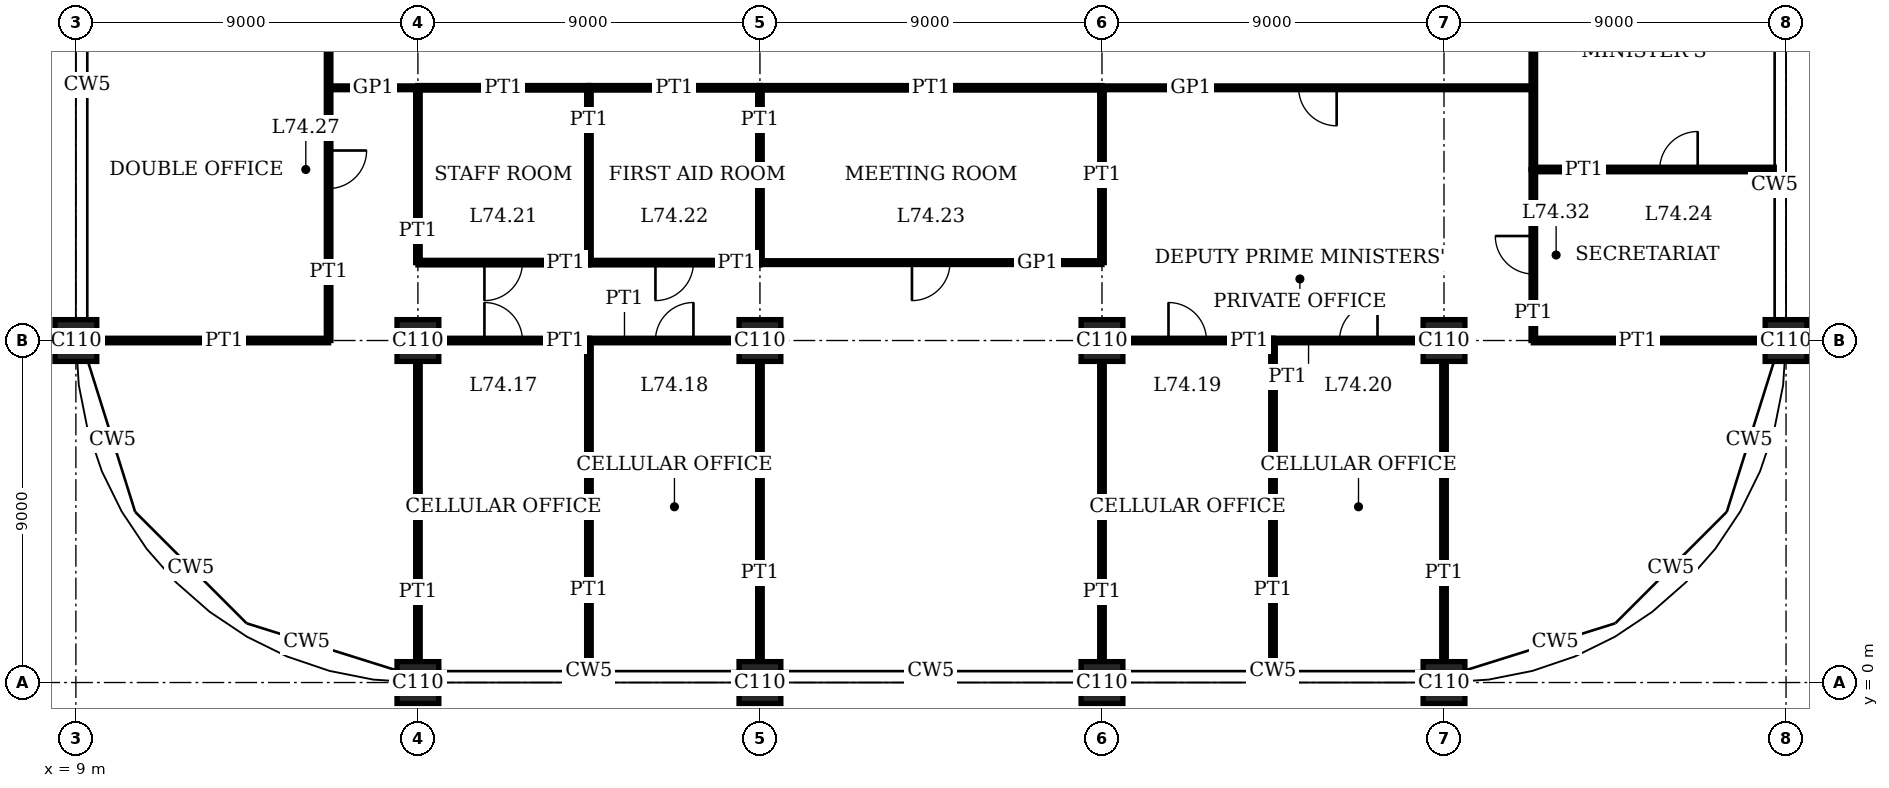
"""IFC4 building model, lengths in metres.
Left out: names, types, materials, properties, quantities, classifications, styles, units other than length and angle.
Written with IfcOpenShell. Run it as: python <this file> out.ifc"""

import sys

from ifc_helpers import new_model, si_unit, direction, frame, frame_2d, origin, origin_2d, place, context, subcontext, project, spatial, rectangle, extrude, element, fill, save


model = new_model("IFC4")
c1 = context("Model", 3, precision=1e-05, world=origin(), true_north=direction((0.0, 1.0)))
c2 = subcontext(c1, "Body", "Model", "MODEL_VIEW")
j1 = project(units=[si_unit("LENGTHUNIT", "METRE"), si_unit("PLANEANGLEUNIT", "RADIAN")], contexts=[c1])
p1 = place(None, origin())
s1 = spatial("IfcSite", under=j1, at=p1, CompositionType="ELEMENT")
p2 = place(p1, origin())
s2 = spatial("IfcBuilding", under=s1, at=p2, CompositionType="ELEMENT")
p3 = place(p2, frame((0.0, 0.0, 303.4)))
s3 = spatial("IfcBuildingStorey", under=s2, at=p3, CompositionType="ELEMENT", Elevation=303.4)
for number, where, z_axis, x_axis in (
    (1, (9.0, 9.0, 0.0), (0.0, 0.0, 1.0), (1.0, 0.0, 0.0)),
    (2, (18.0, 0.0, 0.0), (0.0, 0.0, 1.0), (1.0, 0.0, 0.0)),
    (3, (18.0, 9.0, 0.0), (0.0, 0.0, 1.0), (1.0, 0.0, 0.0)),
    (4, (27.0, 0.0, 0.0), (0.0, 0.0, 1.0), (1.0, 0.0, 0.0)),
    (5, (27.0, 9.0, 0.0), (0.0, 0.0, 1.0), (1.0, 0.0, 0.0)),
    (6, (36.0, 0.0, 0.0), (0.0, 0.0, 1.0), (1.0, 0.0, 0.0)),
    (7, (36.0, 9.0, 0.0), (0.0, 0.0, 1.0), (1.0, 0.0, 0.0)),
    (8, (45.0, 0.0, 0.0), (0.0, 0.0, 1.0), (1.0, 0.0, 0.0)),
    (9, (45.0, 9.0, 0.0), (0.0, 0.0, 1.0), (1.0, 0.0, 0.0)),
    (10, (54.0, 9.0, 0.0), (0.0, 0.0, 1.0), (1.0, 0.0, 0.0)),
):
    element("IfcColumn", number, at=place(p3, frame(where, z_axis=z_axis, x_axis=x_axis)), inside=s3, PredefinedType="COLUMN", context=c2, shape_type="SweptSolid", body=[
        extrude(rectangle(XDim=1.1, YDim=1.1, at=origin_2d()), origin(), (0.0, 0.0, 1.0), 4.0),
    ])
p4 = place(p3, frame((47.35, 9.0, 0.0), z_axis=(0.0, 0.0, 1.0), x_axis=(1.0, 0.0, 0.0)))
e11 = element("IfcWall", 11, at=p4, inside=s3, PredefinedType="PARTITIONING", context=c2, shape_type="SweptSolid", body=[
    extrude(rectangle(XDim=6.1, YDim=0.12, at=frame_2d((3.05, 0.0))), origin(), (0.0, 0.0, 1.0), 3.05),
])
p5 = place(p3, frame((18.55, 9.0, 0.0), z_axis=(0.0, 0.0, 1.0), x_axis=(1.0, 0.0, 0.0)))
e12 = element("IfcWall", 12, at=p5, inside=s3, PredefinedType="PARTITIONING", context=c2, shape_type="SweptSolid", body=[
    extrude(rectangle(XDim=3.95, YDim=0.12, at=frame_2d((1.975, 0.0))), origin(), (0.0, 0.0, 1.0), 3.05),
])
p6 = place(p5, frame((1.2, 0.0, 0.0)))
e13 = element("IfcOpeningElement", 13, at=p6, cuts=e12, PredefinedType="OPENING", context=c2, shape_type="SweptSolid", body=[
    extrude(rectangle(XDim=1.0, YDim=2.4, at=frame_2d((0.5, 1.2))), frame((0.0, 0.07, 0.0), z_axis=(0.0, -1.0, 0.0), x_axis=(1.0, 0.0, 0.0)), (0.0, 0.0, 1.0), 0.14),
])
p7 = place(p3, frame((22.5, 9.0, 0.0), z_axis=(0.0, 0.0, 1.0), x_axis=(1.0, 0.0, 0.0)))
e14 = element("IfcWall", 14, at=p7, inside=s3, PredefinedType="PARTITIONING", context=c2, shape_type="SweptSolid", body=[
    extrude(rectangle(XDim=3.95, YDim=0.12, at=frame_2d((1.975, 0.0))), origin(), (0.0, 0.0, 1.0), 3.05),
])
p8 = place(p7, frame((1.75, 0.0, 0.0)))
e15 = element("IfcOpeningElement", 15, at=p8, cuts=e14, PredefinedType="OPENING", context=c2, shape_type="SweptSolid", body=[
    extrude(rectangle(XDim=1.0, YDim=2.4, at=frame_2d((0.5, 1.2))), frame((0.0, 0.07, 0.0), z_axis=(0.0, -1.0, 0.0), x_axis=(1.0, 0.0, 0.0)), (0.0, 0.0, 1.0), 0.14),
])
p9 = place(p3, frame((36.55, 9.0, 0.0), z_axis=(0.0, 0.0, 1.0), x_axis=(1.0, 0.0, 0.0)))
e16 = element("IfcWall", 16, at=p9, inside=s3, PredefinedType="PARTITIONING", context=c2, shape_type="SweptSolid", body=[
    extrude(rectangle(XDim=3.95, YDim=0.12, at=frame_2d((1.975, 0.0))), origin(), (0.0, 0.0, 1.0), 3.05),
])
p10 = place(p9, frame((1.2, 0.0, 0.0)))
e17 = element("IfcOpeningElement", 17, at=p10, cuts=e16, PredefinedType="OPENING", context=c2, shape_type="SweptSolid", body=[
    extrude(rectangle(XDim=1.0, YDim=2.4, at=frame_2d((0.5, 1.2))), frame((0.0, 0.07, 0.0), z_axis=(0.0, -1.0, 0.0), x_axis=(1.0, 0.0, 0.0)), (0.0, 0.0, 1.0), 0.14),
])
p11 = place(p3, frame((40.5, 9.0, 0.0), z_axis=(0.0, 0.0, 1.0), x_axis=(1.0, 0.0, 0.0)))
e18 = element("IfcWall", 18, at=p11, inside=s3, PredefinedType="PARTITIONING", context=c2, shape_type="SweptSolid", body=[
    extrude(rectangle(XDim=3.95, YDim=0.12, at=frame_2d((1.975, 0.0))), origin(), (0.0, 0.0, 1.0), 3.05),
])
p12 = place(p11, frame((1.75, 0.0, 0.0)))
e19 = element("IfcOpeningElement", 19, at=p12, cuts=e18, PredefinedType="OPENING", context=c2, shape_type="SweptSolid", body=[
    extrude(rectangle(XDim=1.0, YDim=2.4, at=frame_2d((0.5, 1.2))), frame((0.0, 0.07, 0.0), z_axis=(0.0, -1.0, 0.0), x_axis=(1.0, 0.0, 0.0)), (0.0, 0.0, 1.0), 0.14),
])
p13 = place(p3, frame((9.55, 9.0, 0.0), z_axis=(0.0, 0.0, 1.0), x_axis=(1.0, 0.0, 0.0)))
e20 = element("IfcWall", 20, at=p13, inside=s3, PredefinedType="PARTITIONING", context=c2, shape_type="SweptSolid", body=[
    extrude(rectangle(XDim=6.1, YDim=0.12, at=frame_2d((3.05, 0.0))), origin(), (0.0, 0.0, 1.0), 3.05),
])
p14 = place(p3, frame((18.0, 11.05, 0.0), z_axis=(0.0, 0.0, 1.0), x_axis=(1.0, 0.0, 0.0)))
e21 = element("IfcWall", 21, at=p14, inside=s3, PredefinedType="PARTITIONING", context=c2, shape_type="SweptSolid", body=[
    extrude(rectangle(XDim=4.5, YDim=0.12, at=frame_2d((2.25, 0.0))), origin(), (0.0, 0.0, 1.0), 3.75),
])
p15 = place(p14, frame((1.75, 0.0, 0.0)))
e22 = element("IfcOpeningElement", 22, at=p15, cuts=e21, PredefinedType="OPENING", context=c2, shape_type="SweptSolid", body=[
    extrude(rectangle(XDim=1.0, YDim=2.4, at=frame_2d((0.5, 1.2))), frame((0.0, 0.07, 0.0), z_axis=(0.0, -1.0, 0.0), x_axis=(1.0, 0.0, 0.0)), (0.0, 0.0, 1.0), 0.14),
])
p16 = place(p3, frame((22.5, 11.05, 0.0), z_axis=(0.0, 0.0, 1.0), x_axis=(1.0, 0.0, 0.0)))
e23 = element("IfcWall", 23, at=p16, inside=s3, PredefinedType="PARTITIONING", context=c2, shape_type="SweptSolid", body=[
    extrude(rectangle(XDim=4.5, YDim=0.12, at=frame_2d((2.25, 0.0))), origin(), (0.0, 0.0, 1.0), 3.75),
])
p17 = place(p16, frame((1.75, 0.0, 0.0)))
e24 = element("IfcOpeningElement", 24, at=p17, cuts=e23, PredefinedType="OPENING", context=c2, shape_type="SweptSolid", body=[
    extrude(rectangle(XDim=1.0, YDim=2.4, at=frame_2d((0.5, 1.2))), frame((0.0, 0.07, 0.0), z_axis=(0.0, -1.0, 0.0), x_axis=(1.0, 0.0, 0.0)), (0.0, 0.0, 1.0), 0.14),
])
p18 = place(p3, frame((27.0, 11.05, 0.0), z_axis=(0.0, 0.0, 1.0), x_axis=(1.0, 0.0, 0.0)))
e25 = element("IfcWall", 25, at=p18, inside=s3, PredefinedType="PARTITIONING", context=c2, shape_type="SweptSolid", body=[
    extrude(rectangle(XDim=9.0, YDim=0.1, at=frame_2d((4.5, 0.0))), origin(), (0.0, 0.0, 1.0), 3.75),
])
p19 = place(p18, frame((4.0, 0.0, 0.0)))
e26 = element("IfcOpeningElement", 26, at=p19, cuts=e25, PredefinedType="OPENING", context=c2, shape_type="SweptSolid", body=[
    extrude(rectangle(XDim=1.0, YDim=2.4, at=frame_2d((0.5, 1.2))), frame((0.0, 0.06, 0.0), z_axis=(0.0, -1.0, 0.0), x_axis=(1.0, 0.0, 0.0)), (0.0, 0.0, 1.0), 0.12),
])
p20 = place(p3, frame((47.35, 13.5, 0.0), z_axis=(0.0, 0.0, 1.0), x_axis=(1.0, 0.0, 0.0)))
e27 = element("IfcWall", 27, at=p20, inside=s3, PredefinedType="PARTITIONING", context=c2, shape_type="SweptSolid", body=[
    extrude(rectangle(XDim=6.34, YDim=0.12, at=frame_2d((3.17, 0.0))), origin(), (0.0, 0.0, 1.0), 3.1),
])
p21 = place(p20, frame((3.325, 0.0, 0.0)))
e28 = element("IfcOpeningElement", 28, at=p21, cuts=e27, PredefinedType="OPENING", context=c2, shape_type="SweptSolid", body=[
    extrude(rectangle(XDim=1.0, YDim=2.4, at=frame_2d((0.5, 1.2))), frame((0.0, 0.07, 0.0), z_axis=(0.0, -1.0, 0.0), x_axis=(1.0, 0.0, 0.0)), (0.0, 0.0, 1.0), 0.14),
])
p22 = place(p3, frame((27.0, 15.65, 0.0), z_axis=(0.0, 0.0, 1.0), x_axis=(1.0, 0.0, 0.0)))
e29 = element("IfcWall", 29, at=p22, inside=s3, PredefinedType="PARTITIONING", context=c2, shape_type="SweptSolid", body=[
    extrude(rectangle(XDim=9.0, YDim=0.12, at=frame_2d((4.5, 0.0))), origin(), (0.0, 0.0, 1.0), 3.75),
])
for number, where, z_axis, x_axis in (
    (30, (18.0, 15.65, 0.0), (0.0, 0.0, 1.0), (1.0, 0.0, 0.0)),
    (31, (22.5, 15.65, 0.0), (0.0, 0.0, 1.0), (1.0, 0.0, 0.0)),
):
    element("IfcWall", number, at=place(p3, frame(where, z_axis=z_axis, x_axis=x_axis)), inside=s3, PredefinedType="PARTITIONING", context=c2, shape_type="SweptSolid", body=[
        extrude(rectangle(XDim=4.5, YDim=0.12, at=frame_2d((2.25, 0.0))), origin(), (0.0, 0.0, 1.0), 3.75),
    ])
p23 = place(p3, frame((36.01, 15.65, 0.0), z_axis=(0.0, 0.0, 1.0), x_axis=(1.0, 0.0, 0.0)))
e32 = element("IfcWall", 32, at=p23, inside=s3, PredefinedType="PARTITIONING", context=c2, shape_type="SweptSolid", body=[
    extrude(rectangle(XDim=11.33, YDim=0.1, at=frame_2d((5.665, 0.0))), origin(), (0.0, 0.0, 1.0), 3.75),
])
p24 = place(p23, frame((5.165, 0.0, 0.0)))
e33 = element("IfcOpeningElement", 33, at=p24, cuts=e32, PredefinedType="OPENING", context=c2, shape_type="SweptSolid", body=[
    extrude(rectangle(XDim=1.0, YDim=2.4, at=frame_2d((0.5, 1.2))), frame((0.0, 0.06, 0.0), z_axis=(0.0, -1.0, 0.0), x_axis=(1.0, 0.0, 0.0)), (0.0, 0.0, 1.0), 0.12),
])
p25 = place(p3, frame((15.66, 15.65, 0.0), z_axis=(0.0, 0.0, 1.0), x_axis=(1.0, 0.0, 0.0)))
e34 = element("IfcWall", 34, at=p25, inside=s3, PredefinedType="PARTITIONING", context=c2, shape_type="SweptSolid", body=[
    extrude(rectangle(XDim=2.33, YDim=0.1, at=frame_2d((1.165, 0.0))), origin(), (0.0, 0.0, 1.0), 3.75),
])
p26 = place(p3, frame((15.65, 9.0, 0.0), z_axis=(0.0, 0.0, 1.0), x_axis=(0.0, 1.0, 0.0)))
e35 = element("IfcWall", 35, at=p26, inside=s3, PredefinedType="PARTITIONING", context=c2, shape_type="SweptSolid", body=[
    extrude(rectangle(XDim=9.0, YDim=0.12, at=frame_2d((4.5, 0.0))), origin(), (0.0, 0.0, 1.0), 3.75),
])
p27 = place(p26, frame((4.0, 0.0, 0.0)))
e36 = element("IfcOpeningElement", 36, at=p27, cuts=e35, PredefinedType="OPENING", context=c2, shape_type="SweptSolid", body=[
    extrude(rectangle(XDim=1.0, YDim=2.4, at=frame_2d((0.5, 1.2))), frame((0.0, 0.07, 0.0), z_axis=(0.0, -1.0, 0.0), x_axis=(1.0, 0.0, 0.0)), (0.0, 0.0, 1.0), 0.14),
])
p28 = place(p3, frame((18.0, 0.55, 0.0), z_axis=(0.0, 0.0, 1.0), x_axis=(0.0, 1.0, 0.0)))
e37 = element("IfcWall", 37, at=p28, inside=s3, PredefinedType="PARTITIONING", context=c2, shape_type="SweptSolid", body=[
    extrude(rectangle(XDim=7.9, YDim=0.12, at=frame_2d((3.95, 0.0))), origin(), (0.0, 0.0, 1.0), 3.05),
])
p29 = place(p3, frame((18.0, 11.05, 0.0), z_axis=(0.0, 0.0, 1.0), x_axis=(0.0, 1.0, 0.0)))
e38 = element("IfcWall", 38, at=p29, inside=s3, PredefinedType="PARTITIONING", context=c2, shape_type="SweptSolid", body=[
    extrude(rectangle(XDim=4.6, YDim=0.12, at=frame_2d((2.3, 0.0))), origin(), (0.0, 0.0, 1.0), 3.05),
])
p30 = place(p3, frame((22.5, 0.31, 0.0), z_axis=(0.0, 0.0, 1.0), x_axis=(0.0, 1.0, 0.0)))
e39 = element("IfcWall", 39, at=p30, inside=s3, PredefinedType="PARTITIONING", context=c2, shape_type="SweptSolid", body=[
    extrude(rectangle(XDim=8.69, YDim=0.12, at=frame_2d((4.345, 0.0))), origin(), (0.0, 0.0, 1.0), 3.75),
])
p31 = place(p3, frame((22.5, 11.05, 0.0), z_axis=(0.0, 0.0, 1.0), x_axis=(0.0, 1.0, 0.0)))
e40 = element("IfcWall", 40, at=p31, inside=s3, PredefinedType="PARTITIONING", context=c2, shape_type="SweptSolid", body=[
    extrude(rectangle(XDim=4.6, YDim=0.12, at=frame_2d((2.3, 0.0))), origin(), (0.0, 0.0, 1.0), 3.75),
])
p32 = place(p3, frame((27.0, 0.55, 0.0), z_axis=(0.0, 0.0, 1.0), x_axis=(0.0, 1.0, 0.0)))
e41 = element("IfcWall", 41, at=p32, inside=s3, PredefinedType="PARTITIONING", context=c2, shape_type="SweptSolid", body=[
    extrude(rectangle(XDim=7.9, YDim=0.12, at=frame_2d((3.95, 0.0))), origin(), (0.0, 0.0, 1.0), 3.05),
])
p33 = place(p3, frame((27.0, 11.05, 0.0), z_axis=(0.0, 0.0, 1.0), x_axis=(0.0, 1.0, 0.0)))
e42 = element("IfcWall", 42, at=p33, inside=s3, PredefinedType="PARTITIONING", context=c2, shape_type="SweptSolid", body=[
    extrude(rectangle(XDim=4.6, YDim=0.12, at=frame_2d((2.3, 0.0))), origin(), (0.0, 0.0, 1.0), 3.05),
])
p34 = place(p3, frame((36.0, 0.55, 0.0), z_axis=(0.0, 0.0, 1.0), x_axis=(0.0, 1.0, 0.0)))
e43 = element("IfcWall", 43, at=p34, inside=s3, PredefinedType="PARTITIONING", context=c2, shape_type="SweptSolid", body=[
    extrude(rectangle(XDim=7.9, YDim=0.12, at=frame_2d((3.95, 0.0))), origin(), (0.0, 0.0, 1.0), 3.05),
])
p35 = place(p3, frame((36.0, 11.05, 0.0), z_axis=(0.0, 0.0, 1.0), x_axis=(0.0, 1.0, 0.0)))
e44 = element("IfcWall", 44, at=p35, inside=s3, PredefinedType="PARTITIONING", context=c2, shape_type="SweptSolid", body=[
    extrude(rectangle(XDim=4.6, YDim=0.12, at=frame_2d((2.3, 0.0))), origin(), (0.0, 0.0, 1.0), 3.05),
])
p36 = place(p3, frame((40.5, 0.31, 0.0), z_axis=(0.0, 0.0, 1.0), x_axis=(0.0, 1.0, 0.0)))
e45 = element("IfcWall", 45, at=p36, inside=s3, PredefinedType="PARTITIONING", context=c2, shape_type="SweptSolid", body=[
    extrude(rectangle(XDim=8.69, YDim=0.12, at=frame_2d((4.345, 0.0))), origin(), (0.0, 0.0, 1.0), 3.75),
])
p37 = place(p3, frame((45.0, 0.55, 0.0), z_axis=(0.0, 0.0, 1.0), x_axis=(0.0, 1.0, 0.0)))
e46 = element("IfcWall", 46, at=p37, inside=s3, PredefinedType="PARTITIONING", context=c2, shape_type="SweptSolid", body=[
    extrude(rectangle(XDim=7.9, YDim=0.12, at=frame_2d((3.95, 0.0))), origin(), (0.0, 0.0, 1.0), 3.05),
])
p38 = place(p3, frame((47.35, 9.0, 0.0), z_axis=(0.0, 0.0, 1.0), x_axis=(0.0, 1.0, 0.0)))
e47 = element("IfcWall", 47, at=p38, inside=s3, PredefinedType="PARTITIONING", context=c2, shape_type="SweptSolid", body=[
    extrude(rectangle(XDim=4.5, YDim=0.12, at=frame_2d((2.25, 0.0))), origin(), (0.0, 0.0, 1.0), 3.75),
])
p39 = place(p38, frame((1.75, 0.0, 0.0)))
e48 = element("IfcOpeningElement", 48, at=p39, cuts=e47, PredefinedType="OPENING", context=c2, shape_type="SweptSolid", body=[
    extrude(rectangle(XDim=1.0, YDim=2.4, at=frame_2d((0.5, 1.2))), frame((0.0, 0.07, 0.0), z_axis=(0.0, -1.0, 0.0), x_axis=(1.0, 0.0, 0.0)), (0.0, 0.0, 1.0), 0.14),
])
p40 = place(p3, frame((47.35, 13.5, 0.0), z_axis=(0.0, 0.0, 1.0), x_axis=(0.0, 1.0, 0.0)))
e49 = element("IfcWall", 49, at=p40, inside=s3, PredefinedType="PARTITIONING", context=c2, shape_type="SweptSolid", body=[
    extrude(rectangle(XDim=9.0, YDim=0.12, at=frame_2d((4.5, 0.0))), origin(), (0.0, 0.0, 1.0), 3.75),
])
p41 = place(p6, origin())
e50 = element("IfcDoor", 50, at=p41, inside=s3, OperationType="SINGLE_SWING_RIGHT", PredefinedType="DOOR", context=c2, shape_type="SweptSolid", body=[
    extrude(rectangle(XDim=1.0, YDim=2.4, at=frame_2d((0.5, 1.2))), frame((0.0, 0.025, 0.0), z_axis=(0.0, -1.0, 0.0), x_axis=(1.0, 0.0, 0.0)), (0.0, 0.0, 1.0), 0.05),
])
fill(e13, e50)
p42 = place(p8, origin())
e51 = element("IfcDoor", 51, at=p42, inside=s3, OperationType="SINGLE_SWING_LEFT", PredefinedType="DOOR", context=c2, shape_type="SweptSolid", body=[
    extrude(rectangle(XDim=1.0, YDim=2.4, at=frame_2d((0.5, 1.2))), frame((0.0, 0.025, 0.0), z_axis=(0.0, -1.0, 0.0), x_axis=(1.0, 0.0, 0.0)), (0.0, 0.0, 1.0), 0.05),
])
fill(e15, e51)
p43 = place(p10, origin())
e52 = element("IfcDoor", 52, at=p43, inside=s3, OperationType="SINGLE_SWING_RIGHT", PredefinedType="DOOR", context=c2, shape_type="SweptSolid", body=[
    extrude(rectangle(XDim=1.0, YDim=2.4, at=frame_2d((0.5, 1.2))), frame((0.0, 0.025, 0.0), z_axis=(0.0, -1.0, 0.0), x_axis=(1.0, 0.0, 0.0)), (0.0, 0.0, 1.0), 0.05),
])
fill(e17, e52)
p44 = place(p12, origin())
e53 = element("IfcDoor", 53, at=p44, inside=s3, OperationType="SINGLE_SWING_LEFT", PredefinedType="DOOR", context=c2, shape_type="SweptSolid", body=[
    extrude(rectangle(XDim=1.0, YDim=2.4, at=frame_2d((0.5, 1.2))), frame((0.0, 0.025, 0.0), z_axis=(0.0, -1.0, 0.0), x_axis=(1.0, 0.0, 0.0)), (0.0, 0.0, 1.0), 0.05),
])
fill(e19, e53)
p45 = place(p15, origin())
e54 = element("IfcDoor", 54, at=p45, inside=s3, OperationType="SINGLE_SWING_LEFT", PredefinedType="DOOR", context=c2, shape_type="SweptSolid", body=[
    extrude(rectangle(XDim=1.0, YDim=2.4, at=frame_2d((0.5, 1.2))), frame((0.0, 0.025, 0.0), z_axis=(0.0, -1.0, 0.0), x_axis=(1.0, 0.0, 0.0)), (0.0, 0.0, 1.0), 0.05),
])
fill(e22, e54)
p46 = place(p17, origin())
e55 = element("IfcDoor", 55, at=p46, inside=s3, OperationType="SINGLE_SWING_LEFT", PredefinedType="DOOR", context=c2, shape_type="SweptSolid", body=[
    extrude(rectangle(XDim=1.0, YDim=2.4, at=frame_2d((0.5, 1.2))), frame((0.0, 0.025, 0.0), z_axis=(0.0, -1.0, 0.0), x_axis=(1.0, 0.0, 0.0)), (0.0, 0.0, 1.0), 0.05),
])
fill(e24, e55)
p47 = place(p19, origin())
e56 = element("IfcDoor", 56, at=p47, inside=s3, OperationType="SINGLE_SWING_LEFT", PredefinedType="DOOR", context=c2, shape_type="SweptSolid", body=[
    extrude(rectangle(XDim=1.0, YDim=2.4, at=frame_2d((0.5, 1.2))), frame((0.0, 0.02, 0.0), z_axis=(0.0, -1.0, 0.0), x_axis=(1.0, 0.0, 0.0)), (0.0, 0.0, 1.0), 0.04),
])
fill(e26, e56)
p48 = place(p21, origin())
e57 = element("IfcDoor", 57, at=p48, inside=s3, OperationType="SINGLE_SWING_LEFT", PredefinedType="DOOR", context=c2, shape_type="SweptSolid", body=[
    extrude(rectangle(XDim=1.0, YDim=2.4, at=frame_2d((0.5, 1.2))), frame((0.0, 0.025, 0.0), z_axis=(0.0, -1.0, 0.0), x_axis=(1.0, 0.0, 0.0)), (0.0, 0.0, 1.0), 0.05),
])
fill(e28, e57)
p49 = place(p24, origin())
e58 = element("IfcDoor", 58, at=p49, inside=s3, OperationType="SINGLE_SWING_RIGHT", PredefinedType="DOOR", context=c2, shape_type="SweptSolid", body=[
    extrude(rectangle(XDim=1.0, YDim=2.4, at=frame_2d((0.5, 1.2))), frame((0.0, 0.02, 0.0), z_axis=(0.0, -1.0, 0.0), x_axis=(1.0, 0.0, 0.0)), (0.0, 0.0, 1.0), 0.04),
])
fill(e33, e58)
p50 = place(p27, origin())
e59 = element("IfcDoor", 59, at=p50, inside=s3, OperationType="SINGLE_SWING_RIGHT", PredefinedType="DOOR", context=c2, shape_type="SweptSolid", body=[
    extrude(rectangle(XDim=1.0, YDim=2.4, at=frame_2d((0.5, 1.2))), frame((0.0, 0.025, 0.0), z_axis=(0.0, -1.0, 0.0), x_axis=(1.0, 0.0, 0.0)), (0.0, 0.0, 1.0), 0.05),
])
fill(e36, e59)
p51 = place(p39, origin())
e60 = element("IfcDoor", 60, at=p51, inside=s3, OperationType="SINGLE_SWING_LEFT", PredefinedType="DOOR", context=c2, shape_type="SweptSolid", body=[
    extrude(rectangle(XDim=1.0, YDim=2.4, at=frame_2d((0.5, 1.2))), frame((0.0, 0.025, 0.0), z_axis=(0.0, -1.0, 0.0), x_axis=(1.0, 0.0, 0.0)), (0.0, 0.0, 1.0), 0.05),
])
fill(e48, e60)
save(model, sys.argv[1])
